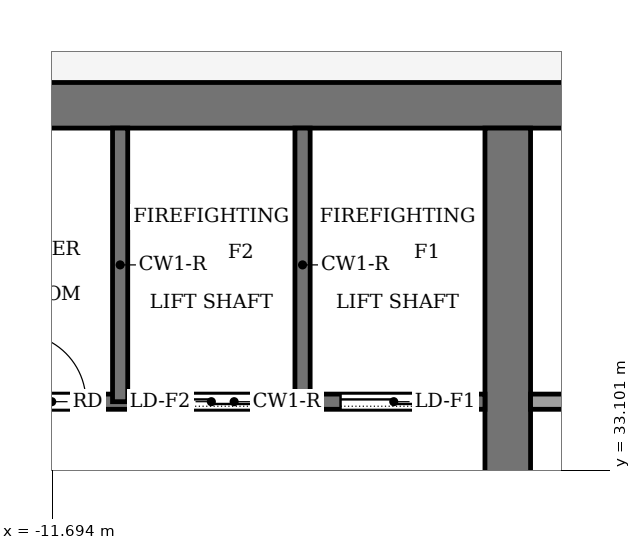
"""IFC4 building model, lengths in metres.
Left out: names, types, materials, properties, quantities, classifications, styles, units other than length and angle.
Written with IfcOpenShell. Run it as: python <this file> out.ifc"""

import sys

from ifc_helpers import new_model, si_unit, direction, frame, frame_2d, origin, place, context, subcontext, project, spatial, rectangle, extrude, element, fill, save


model = new_model("IFC4")
c1 = context("Model", 3, precision=1e-05, world=origin(), true_north=direction((0.0, 1.0)))
c2 = subcontext(c1, "Body", "Model", "MODEL_VIEW")
j1 = project(units=[si_unit("LENGTHUNIT", "METRE"), si_unit("PLANEANGLEUNIT", "RADIAN")], contexts=[c1])
p1 = place(None, origin())
s1 = spatial("IfcSite", under=j1, at=p1, CompositionType="ELEMENT")
p2 = place(p1, origin())
s2 = spatial("IfcBuilding", under=s1, at=p2, CompositionType="ELEMENT")
p3 = place(p2, frame((0.0, 0.0, 349.5)))
s3 = spatial("IfcBuildingStorey", under=s2, at=p3, CompositionType="ELEMENT", Elevation=349.5)
p4 = place(p3, frame((-13.2, 37.9, -0.15), z_axis=(0.0, 0.0, 1.0), x_axis=(1.0, 0.0, 0.0)))
e1 = element("IfcWall", 1, at=p4, inside=s3, PredefinedType="SHEAR", context=c2, shape_type="SweptSolid", body=[
    extrude(rectangle(XDim=26.4, YDim=0.6, at=frame_2d((13.2, 0.0))), origin(), (0.0, 0.0, 1.0), 5.0),
])
p5 = place(p3, frame((-5.7, 18.4, -0.15), z_axis=(0.0, 0.0, 1.0), x_axis=(0.0, 1.0, 0.0)))
e2 = element("IfcWall", 2, at=p5, inside=s3, PredefinedType="SHEAR", context=c2, shape_type="SweptSolid", body=[
    extrude(rectangle(XDim=19.2, YDim=0.6, at=frame_2d((9.6, 0.0))), origin(), (0.0, 0.0, 1.0), 5.0),
])
p6 = place(p5, frame((8.35, 0.0, 0.15)))
e3 = element("IfcOpeningElement", 3, at=p6, cuts=e2, PredefinedType="OPENING", context=c2, shape_type="SweptSolid", body=[
    extrude(rectangle(XDim=0.9, YDim=2.1, at=frame_2d((0.45, 1.05))), frame((0.0, 0.31, 0.0), z_axis=(0.0, -1.0, 0.0), x_axis=(1.0, 0.0, 0.0)), (0.0, 0.0, 1.0), 0.62),
])
p7 = place(p3, frame((-12.6, 34.0, 0.0), z_axis=(0.0, 0.0, 1.0), x_axis=(1.0, 0.0, 0.0)))
e4 = element("IfcWall", 4, at=p7, inside=s3, PredefinedType="PARTITIONING", context=c2, shape_type="SweptSolid", body=[
    extrude(rectangle(XDim=6.6, YDim=0.2, at=frame_2d((3.3, 0.0))), origin(), (0.0, 0.0, 1.0), 4.85),
])
p8 = place(p7, frame((4.7, 0.0, 0.0)))
e5 = element("IfcOpeningElement", 5, at=p8, cuts=e4, PredefinedType="OPENING", context=c2, shape_type="SweptSolid", body=[
    extrude(rectangle(XDim=1.4, YDim=2.2, at=frame_2d((0.7, 1.1))), frame((0.0, 0.11, 0.0), z_axis=(0.0, -1.0, 0.0), x_axis=(1.0, 0.0, 0.0)), (0.0, 0.0, 1.0), 0.22),
])
p9 = place(p7, frame((2.3, 0.0, 0.0)))
e6 = element("IfcOpeningElement", 6, at=p9, cuts=e4, PredefinedType="OPENING", context=c2, shape_type="SweptSolid", body=[
    extrude(rectangle(XDim=1.4, YDim=2.2, at=frame_2d((0.7, 1.1))), frame((0.0, 0.11, 0.0), z_axis=(0.0, -1.0, 0.0), x_axis=(1.0, 0.0, 0.0)), (0.0, 0.0, 1.0), 0.22),
])
p10 = place(p7, frame((0.45, 0.0, 0.0)))
e7 = element("IfcOpeningElement", 7, at=p10, cuts=e4, PredefinedType="OPENING", context=c2, shape_type="SweptSolid", body=[
    extrude(rectangle(XDim=0.9, YDim=2.1, at=frame_2d((0.45, 1.05))), frame((0.0, 0.11, 0.0), z_axis=(0.0, -1.0, 0.0), x_axis=(1.0, 0.0, 0.0)), (0.0, 0.0, 1.0), 0.22),
])
p11 = place(p3, frame((-5.4, 34.0, 0.0), z_axis=(0.0, 0.0, 1.0), x_axis=(1.0, 0.0, 0.0)))
e8 = element("IfcWall", 8, at=p11, inside=s3, PredefinedType="PARTITIONING", context=c2, shape_type="SweptSolid", body=[
    extrude(rectangle(XDim=10.8, YDim=0.2, at=frame_2d((5.4, 0.0))), origin(), (0.0, 0.0, 1.0), 4.85),
])
p12 = place(p11, frame((3.55, 0.0, 0.0)))
e9 = element("IfcOpeningElement", 9, at=p12, cuts=e8, PredefinedType="OPENING", context=c2, shape_type="SweptSolid", body=[
    extrude(rectangle(XDim=1.0, YDim=2.1, at=frame_2d((0.5, 1.05))), frame((0.0, 0.11, 0.0), z_axis=(0.0, -1.0, 0.0), x_axis=(1.0, 0.0, 0.0)), (0.0, 0.0, 1.0), 0.22),
])
p13 = place(p11, frame((8.95, 0.0, 0.0)))
e10 = element("IfcOpeningElement", 10, at=p13, cuts=e8, PredefinedType="OPENING", context=c2, shape_type="SweptSolid", body=[
    extrude(rectangle(XDim=1.0, YDim=2.1, at=frame_2d((0.5, 1.05))), frame((0.0, 0.11, 0.0), z_axis=(0.0, -1.0, 0.0), x_axis=(1.0, 0.0, 0.0)), (0.0, 0.0, 1.0), 0.22),
])
for number, where, z_axis, x_axis in (
    (11, (-10.8, 34.0, 0.0), (0.0, 0.0, 1.0), (0.0, 1.0, 0.0)),
    (12, (-8.4, 34.0, 0.0), (0.0, 0.0, 1.0), (0.0, 1.0, 0.0)),
):
    element("IfcWall", number, at=place(p3, frame(where, z_axis=z_axis, x_axis=x_axis)), inside=s3, PredefinedType="PARTITIONING", context=c2, shape_type="SweptSolid", body=[
        extrude(rectangle(XDim=3.6, YDim=0.2, at=frame_2d((1.8, 0.0))), origin(), (0.0, 0.0, 1.0), 4.85),
    ])
p14 = place(p8, origin())
e13 = element("IfcDoor", 13, at=p14, inside=s3, OperationType="SLIDING_TO_LEFT", PredefinedType="DOOR", context=c2, shape_type="SweptSolid", body=[
    extrude(rectangle(XDim=1.4, YDim=2.2, at=frame_2d((0.7, 1.1))), frame((0.0, 0.025, 0.0), z_axis=(0.0, -1.0, 0.0), x_axis=(1.0, 0.0, 0.0)), (0.0, 0.0, 1.0), 0.05),
])
fill(e5, e13)
p15 = place(p9, origin())
e14 = element("IfcDoor", 14, at=p15, inside=s3, OperationType="SLIDING_TO_LEFT", PredefinedType="DOOR", context=c2, shape_type="SweptSolid", body=[
    extrude(rectangle(XDim=1.4, YDim=2.2, at=frame_2d((0.7, 1.1))), frame((0.0, 0.025, 0.0), z_axis=(0.0, -1.0, 0.0), x_axis=(1.0, 0.0, 0.0)), (0.0, 0.0, 1.0), 0.05),
])
fill(e6, e14)
p16 = place(p10, origin())
e15 = element("IfcDoor", 15, at=p16, inside=s3, OperationType="SINGLE_SWING_LEFT", PredefinedType="DOOR", context=c2, shape_type="SweptSolid", body=[
    extrude(rectangle(XDim=0.9, YDim=2.1, at=frame_2d((0.45, 1.05))), frame((0.0, 0.025, 0.0), z_axis=(0.0, -1.0, 0.0), x_axis=(1.0, 0.0, 0.0)), (0.0, 0.0, 1.0), 0.05),
])
fill(e7, e15)
save(model, sys.argv[1])
